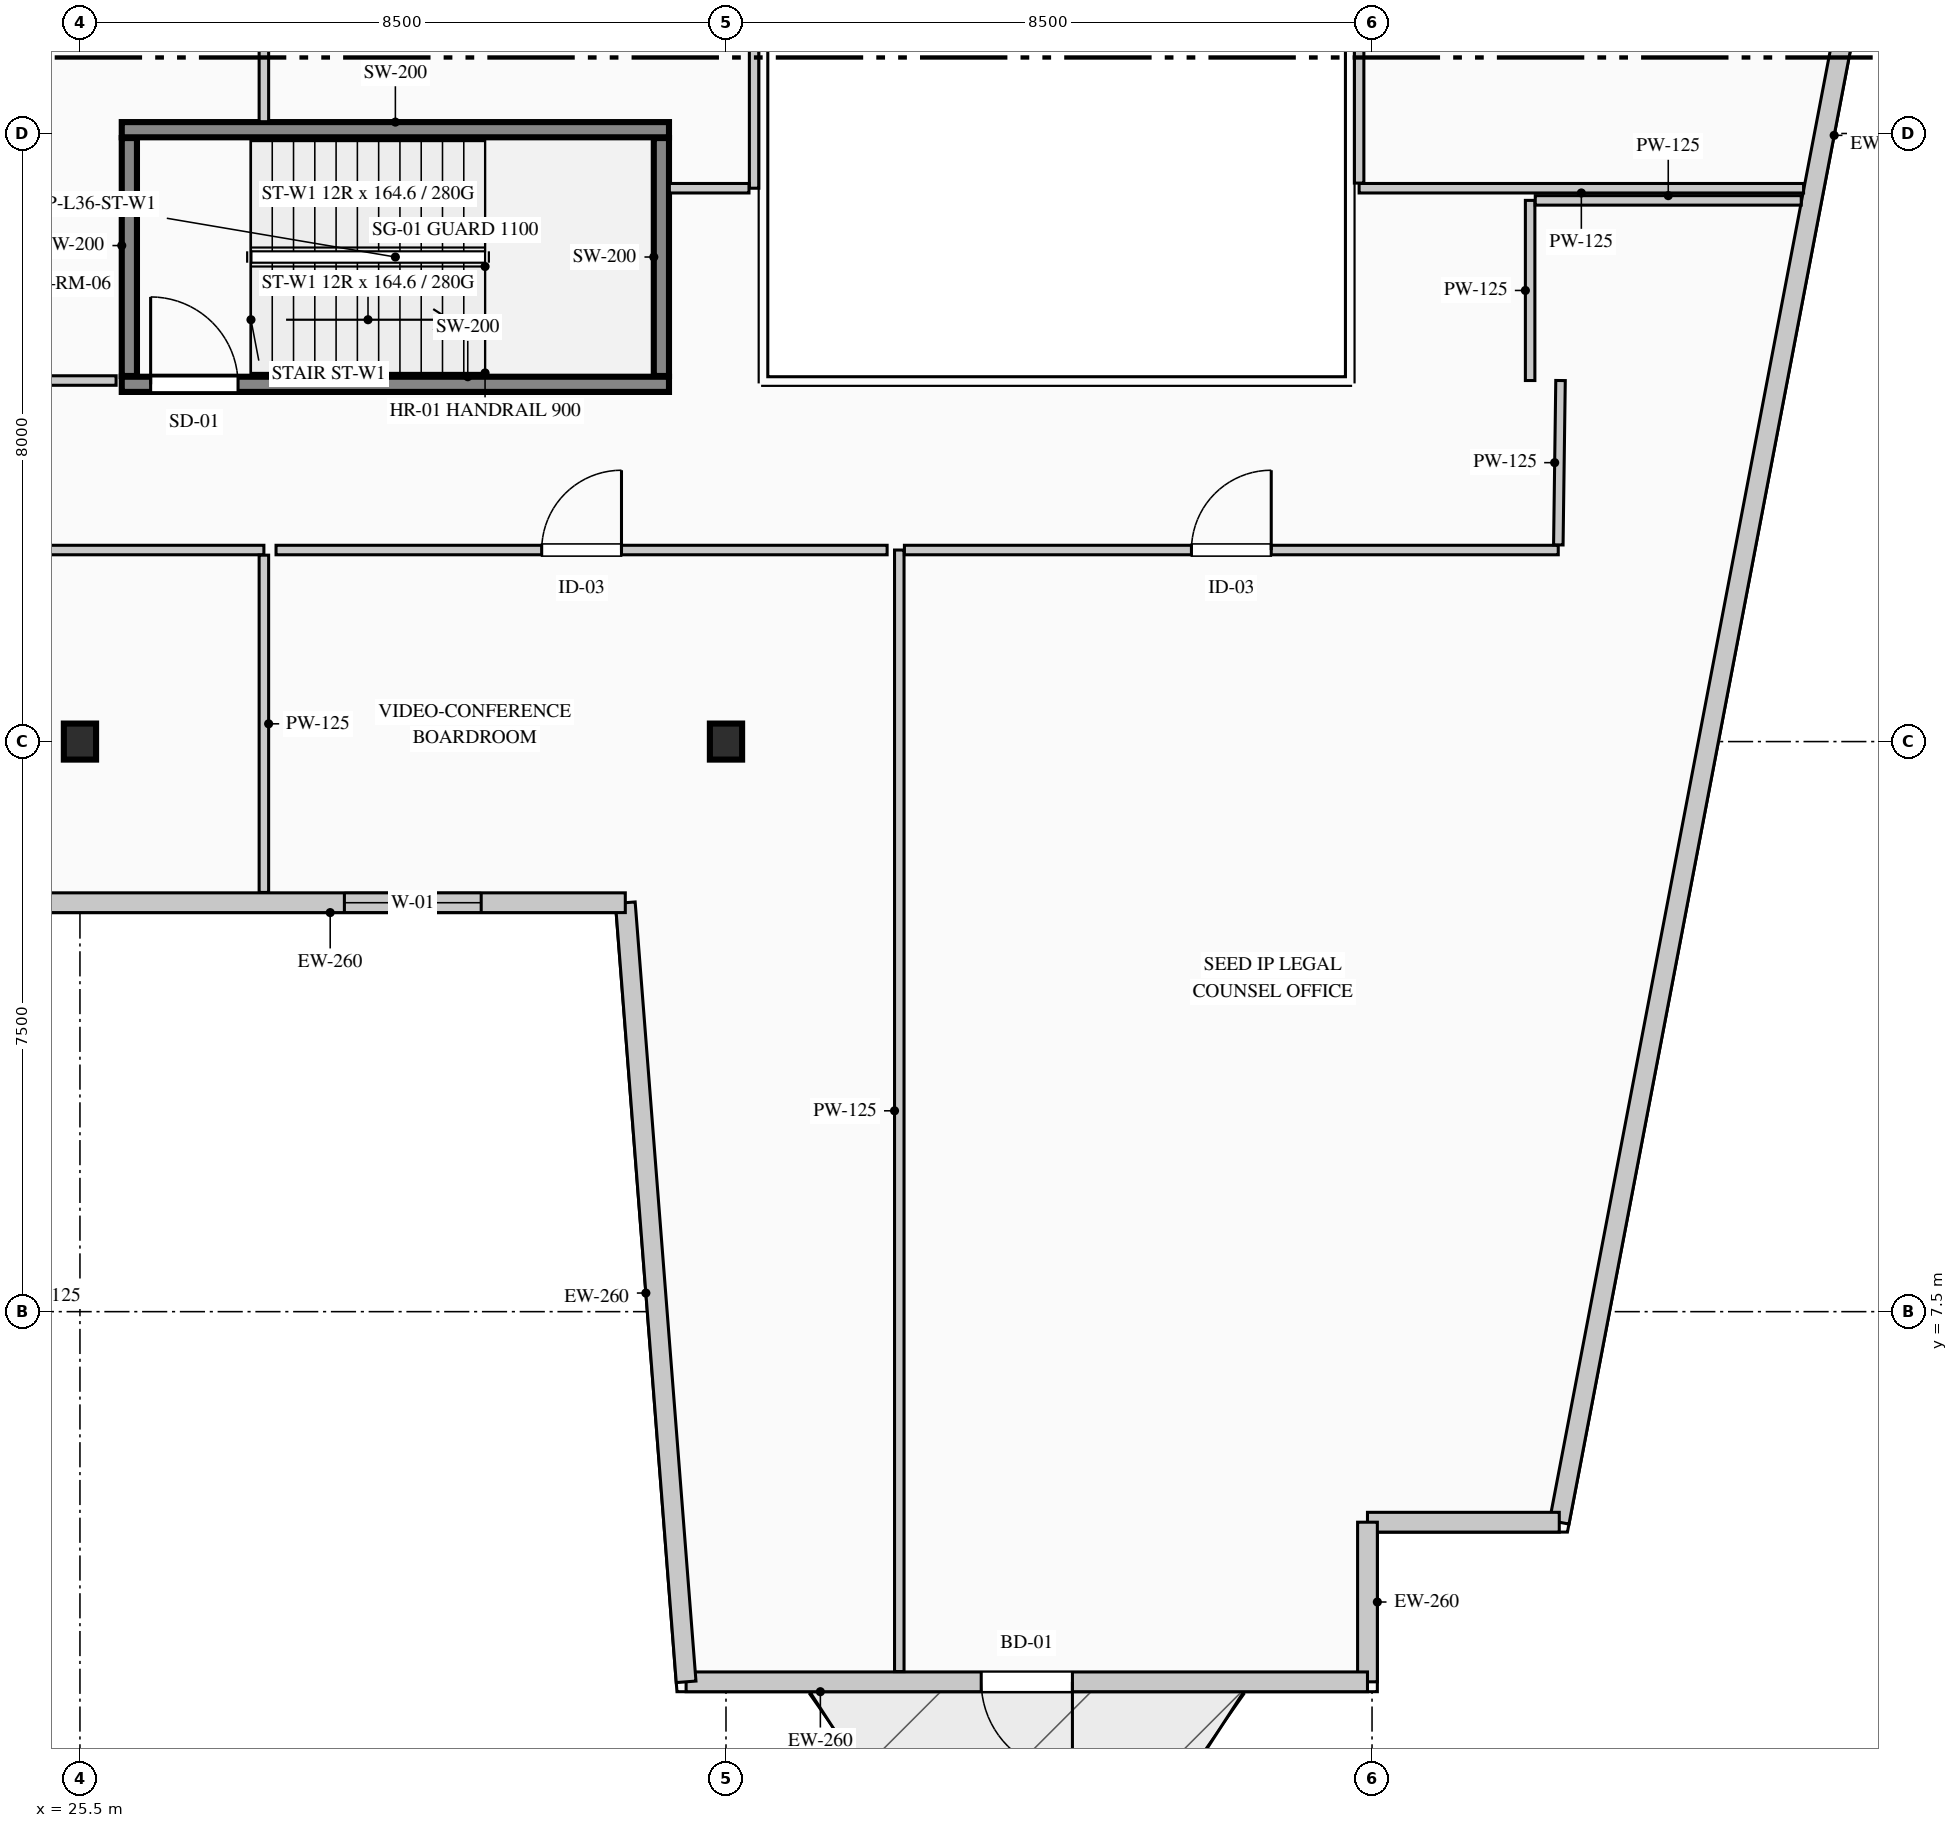
"""IFC4 building model, lengths in metres.
Left out: names, types, materials, properties, quantities, classifications, styles, units other than length and angle.
Written with IfcOpenShell. Run it as: python <this file> out.ifc"""

import sys

from ifc_helpers import new_model, si_unit, direction, frame, frame_2d, origin, origin_2d, place, context, subcontext, project, spatial, rectangle, i_section, extrude, element, fill, save


model = new_model("IFC4")
c1 = context("Model", 3, precision=1e-05, world=origin(), true_north=direction((0.0, 1.0)))
c2 = subcontext(c1, "Body", "Model", "MODEL_VIEW")
j1 = project(units=[si_unit("LENGTHUNIT", "METRE"), si_unit("PLANEANGLEUNIT", "RADIAN")], contexts=[c1])
p1 = place(None, origin())
s1 = spatial("IfcSite", under=j1, at=p1, CompositionType="ELEMENT")
p2 = place(p1, origin())
s2 = spatial("IfcBuilding", under=s1, at=p2, CompositionType="ELEMENT")
p3 = place(p2, frame((0.0, 0.0, 154.85)))
s3 = spatial("IfcBuildingStorey", under=s2, at=p3, CompositionType="ELEMENT", Elevation=154.85)
p4 = place(p3, frame((26.05, 19.7, 0.0), z_axis=(0.0, 0.0, 1.0), x_axis=(1.0, 0.0, 0.0)))
e1 = element("IfcWall", 1, at=p4, inside=s3, PredefinedType="SHEAR", context=c2, shape_type="SweptSolid", body=[
    extrude(rectangle(XDim=7.2, YDim=0.2, at=frame_2d((3.6, 0.0))), origin(), (0.0, 0.0, 1.0), 3.95),
])
p5 = place(p4, frame((0.38, 0.0, 0.0)))
e2 = element("IfcOpeningElement", 2, at=p5, cuts=e1, PredefinedType="OPENING", context=c2, shape_type="SweptSolid", body=[
    extrude(rectangle(XDim=1.15, YDim=2.2, at=frame_2d((0.575, 1.1))), frame((0.0, 0.11, 0.0), z_axis=(0.0, -1.0, 0.0), x_axis=(1.0, 0.0, 0.0)), (0.0, 0.0, 1.0), 0.22),
])
p6 = place(p3, frame((26.05, 23.05, 0.0), z_axis=(0.0, 0.0, 1.0), x_axis=(1.0, 0.0, 0.0)))
e3 = element("IfcWall", 3, at=p6, inside=s3, PredefinedType="SHEAR", context=c2, shape_type="SweptSolid", body=[
    extrude(rectangle(XDim=7.2, YDim=0.2, at=frame_2d((3.6, 0.0))), origin(), (0.0, 0.0, 1.0), 3.95),
])
for number, where, z_axis, x_axis in (
    (4, (26.15, 19.81, 0.0), (0.0, 0.0, 1.0), (0.0, 1.0, 0.0)),
    (5, (33.15, 19.81, 0.0), (0.0, 0.0, 1.0), (0.0, 1.0, 0.0)),
):
    element("IfcWall", number, at=place(p3, frame(where, z_axis=z_axis, x_axis=x_axis)), inside=s3, PredefinedType="SHEAR", context=c2, shape_type="SweptSolid", body=[
        extrude(rectangle(XDim=3.13, YDim=0.2, at=frame_2d((1.565, 0.0))), origin(), (0.0, 0.0, 1.0), 3.95),
    ])
for number, where, z_axis, x_axis in (
    (6, (25.5, 15.0, 0.0), (0.0, 0.0, 1.0), (1.0, 0.0, 0.0)),
    (7, (34.0, 15.0, 0.0), (0.0, 0.0, 1.0), (1.0, 0.0, 0.0)),
):
    element("IfcColumn", number, at=place(p3, frame(where, z_axis=z_axis, x_axis=x_axis)), inside=s3, PredefinedType="COLUMN", context=c2, shape_type="SweptSolid", body=[
        extrude(i_section(OverallWidth=0.424, OverallDepth=0.474, WebThickness=0.048, FlangeThickness=0.077, FilletRadius=0.015, at=origin_2d()), origin(), (0.0, 0.0, 1.0), 3.95),
    ])
p7 = place(p3, frame((51.942, 41.27, 0.0), z_axis=(0.0, 0.0, 1.0), x_axis=(-0.187592192405, -0.982247000173, 0.0)))
e8 = element("IfcWall", 8, at=p7, inside=s3, PredefinedType="STANDARD", context=c2, shape_type="SweptSolid", body=[
    extrude(rectangle(XDim=37.2, YDim=0.26, at=frame_2d((18.6, 0.0))), origin(), (0.0, 0.0, 1.0), 3.69),
])
p8 = place(p7, frame((12.342, 0.0, 0.9)))
e9 = element("IfcOpeningElement", 9, at=p8, cuts=e8, PredefinedType="OPENING", context=c2, shape_type="SweptSolid", body=[
    extrude(rectangle(XDim=2.1, YDim=2.0, at=frame_2d((1.05, 1.0))), frame((0.0, 0.14, 0.0), z_axis=(0.0, -1.0, 0.0), x_axis=(1.0, 0.0, 0.0)), (0.0, 0.0, 1.0), 0.28),
])
p9 = place(p3, frame((44.963, 4.73, 0.0), z_axis=(0.0, 0.0, 1.0), x_axis=(-1.0, 0.0, 0.0)))
e10 = element("IfcWall", 10, at=p9, inside=s3, PredefinedType="STANDARD", context=c2, shape_type="SweptSolid", body=[
    extrude(rectangle(XDim=2.523, YDim=0.26, at=frame_2d((1.262, 0.0))), origin(), (0.0, 0.0, 1.0), 3.69),
])
p10 = place(p3, frame((42.44, 4.73, 0.0), z_axis=(0.0, 0.0, 1.0), x_axis=(0.0, -1.0, 0.0)))
e11 = element("IfcWall", 11, at=p10, inside=s3, PredefinedType="STANDARD", context=c2, shape_type="SweptSolid", body=[
    extrude(rectangle(XDim=2.1, YDim=0.26, at=frame_2d((1.05, 0.0))), origin(), (0.0, 0.0, 1.0), 3.69),
])
p11 = place(p3, frame((42.44, 2.63, 0.0), z_axis=(0.0, 0.0, 1.0), x_axis=(-1.0, 0.0, 0.0)))
e12 = element("IfcWall", 12, at=p11, inside=s3, PredefinedType="STANDARD", context=c2, shape_type="SweptSolid", body=[
    extrude(rectangle(XDim=8.965, YDim=0.26, at=frame_2d((4.482, 0.0))), origin(), (0.0, 0.0, 1.0), 3.69),
])
p12 = place(p11, frame((3.882, 0.0, 0.0)))
e13 = element("IfcOpeningElement", 13, at=p12, cuts=e12, PredefinedType="OPENING", context=c2, shape_type="SweptSolid", body=[
    extrude(rectangle(XDim=1.2, YDim=2.2, at=frame_2d((0.6, 1.1))), frame((0.0, 0.14, 0.0), z_axis=(0.0, -1.0, 0.0), x_axis=(1.0, 0.0, 0.0)), (0.0, 0.0, 1.0), 0.28),
])
p13 = place(p3, frame((33.475, 2.63, 0.0), z_axis=(0.0, 0.0, 1.0), x_axis=(-0.077793257511, 0.996969512616, 0.0)))
e14 = element("IfcWall", 14, at=p13, inside=s3, PredefinedType="STANDARD", context=c2, shape_type="SweptSolid", body=[
    extrude(rectangle(XDim=10.281, YDim=0.26, at=frame_2d((5.141, 0.0))), origin(), (0.0, 0.0, 1.0), 3.69),
])
p14 = place(p3, frame((32.675, 12.88, 0.0), z_axis=(0.0, 0.0, 1.0), x_axis=(-1.0, 0.0, 0.0)))
e15 = element("IfcWall", 15, at=p14, inside=s3, PredefinedType="STANDARD", context=c2, shape_type="SweptSolid", body=[
    extrude(rectangle(XDim=7.765, YDim=0.26, at=frame_2d((3.883, 0.0))), origin(), (0.0, 0.0, 1.0), 3.69),
])
p15 = place(p14, frame((1.896, 0.0, 0.9)))
e16 = element("IfcOpeningElement", 16, at=p15, cuts=e15, PredefinedType="OPENING", context=c2, shape_type="SweptSolid", body=[
    extrude(rectangle(XDim=1.8, YDim=2.1, at=frame_2d((0.9, 1.05))), frame((0.0, 0.14, 0.0), z_axis=(0.0, -1.0, 0.0), x_axis=(1.0, 0.0, 0.0)), (0.0, 0.0, 1.0), 0.28),
])
p16 = place(p3, frame((19.58, 17.52, 0.0), z_axis=(0.0, 0.0, 1.0), x_axis=(1.0, 0.0, 0.0)))
e17 = element("IfcWall", 17, at=p16, inside=s3, PredefinedType="PARTITIONING", context=c2, shape_type="SweptSolid", body=[
    extrude(rectangle(XDim=8.34, YDim=0.125, at=frame_2d((4.17, 0.0))), origin(), (0.0, 0.0, 1.0), 3.475),
])
p17 = place(p16, frame((3.645, 0.0, 0.0)))
e18 = element("IfcOpeningElement", 18, at=p17, cuts=e17, PredefinedType="OPENING", context=c2, shape_type="SweptSolid", body=[
    extrude(rectangle(XDim=1.05, YDim=2.15, at=frame_2d((0.525, 1.075))), frame((0.0, 0.073, 0.0), z_axis=(0.0, -1.0, 0.0), x_axis=(1.0, 0.0, 0.0)), (0.0, 0.0, 1.0), 0.145),
])
p18 = place(p3, frame((27.92, 17.452, 0.0), z_axis=(0.0, 0.0, 1.0), x_axis=(0.0, -1.0, 0.0)))
e19 = element("IfcWall", 19, at=p18, inside=s3, PredefinedType="PARTITIONING", context=c2, shape_type="SweptSolid", body=[
    extrude(rectangle(XDim=4.438, YDim=0.125, at=frame_2d((2.219, 0.0))), origin(), (0.0, 0.0, 1.0), 3.69),
])
p19 = place(p3, frame((44.58, 19.75, 0.0), z_axis=(0.0, 0.0, 1.0), x_axis=(0.0, 1.0, 0.0)))
e20 = element("IfcWall", 20, at=p19, inside=s3, PredefinedType="PARTITIONING", context=c2, shape_type="SweptSolid", body=[
    extrude(rectangle(XDim=2.37, YDim=0.125, at=frame_2d((1.185, 0.0))), origin(), (0.0, 0.0, 1.0), 3.69),
])
p20 = place(p3, frame((44.647, 22.12, 0.0), z_axis=(0.0, 0.0, 1.0), x_axis=(1.0, 0.0, 0.0)))
e21 = element("IfcWall", 21, at=p20, inside=s3, PredefinedType="PARTITIONING", context=c2, shape_type="SweptSolid", body=[
    extrude(rectangle(XDim=3.5, YDim=0.125, at=frame_2d((1.75, 0.0))), origin(), (0.0, 0.0, 1.0), 3.69),
])
p21 = place(p3, frame((36.28, 2.765, 0.0), z_axis=(0.0, 0.0, 1.0), x_axis=(0.0, 1.0, 0.0)))
e22 = element("IfcWall", 22, at=p21, inside=s3, PredefinedType="PARTITIONING", context=c2, shape_type="SweptSolid", body=[
    extrude(rectangle(XDim=14.755, YDim=0.125, at=frame_2d((7.377, 0.0))), origin(), (0.0, 0.0, 1.0), 3.69),
])
p22 = place(p3, frame((36.347, 17.52, 0.0), z_axis=(0.0, 0.0, 1.0), x_axis=(1.0, 0.0, 0.0)))
e23 = element("IfcWall", 23, at=p22, inside=s3, PredefinedType="PARTITIONING", context=c2, shape_type="SweptSolid", body=[
    extrude(rectangle(XDim=8.603, YDim=0.125, at=frame_2d((4.301, 0.0))), origin(), (0.0, 0.0, 1.0), 3.69),
])
p23 = place(p22, frame((3.776, 0.0, 0.0)))
e24 = element("IfcOpeningElement", 24, at=p23, cuts=e23, PredefinedType="OPENING", context=c2, shape_type="SweptSolid", body=[
    extrude(rectangle(XDim=1.05, YDim=2.15, at=frame_2d((0.525, 1.075))), frame((0.0, 0.073, 0.0), z_axis=(0.0, -1.0, 0.0), x_axis=(1.0, 0.0, 0.0)), (0.0, 0.0, 1.0), 0.145),
])
p24 = place(p3, frame((44.951, 17.587, 0.0), z_axis=(0.0, 0.0, 1.0), x_axis=(0.01343297167, 0.999909773566, 0.0)))
e25 = element("IfcWall", 25, at=p24, inside=s3, PredefinedType="PARTITIONING", context=c2, shape_type="SweptSolid", body=[
    extrude(rectangle(XDim=2.163, YDim=0.125, at=frame_2d((1.082, 0.0))), origin(), (0.0, 0.0, 1.0), 3.69),
])
p25 = place(p3, frame((28.08, 17.52, 0.0), z_axis=(0.0, 0.0, 1.0), x_axis=(1.0, 0.0, 0.0)))
e26 = element("IfcWall", 26, at=p25, inside=s3, PredefinedType="PARTITIONING", context=c2, shape_type="SweptSolid", body=[
    extrude(rectangle(XDim=8.04, YDim=0.125, at=frame_2d((4.02, 0.0))), origin(), (0.0, 0.0, 1.0), 3.475),
])
p26 = place(p25, frame((3.495, 0.0, 0.0)))
e27 = element("IfcOpeningElement", 27, at=p26, cuts=e26, PredefinedType="OPENING", context=c2, shape_type="SweptSolid", body=[
    extrude(rectangle(XDim=1.05, YDim=2.15, at=frame_2d((0.525, 1.075))), frame((0.0, 0.073, 0.0), z_axis=(0.0, -1.0, 0.0), x_axis=(1.0, 0.0, 0.0)), (0.0, 0.0, 1.0), 0.145),
])
p27 = place(p3, frame((25.976, 19.75, 0.0), z_axis=(0.0, 0.0, 1.0), x_axis=(-1.0, 0.0, 0.0)))
e28 = element("IfcWall", 28, at=p27, inside=s3, PredefinedType="PARTITIONING", context=c2, shape_type="SweptSolid", body=[
    extrude(rectangle(XDim=3.066, YDim=0.125, at=frame_2d((1.533, 0.0))), origin(), (0.0, 0.0, 1.0), 3.69),
])
p28 = place(p27, frame((1.008, 0.0, 0.0)))
e29 = element("IfcOpeningElement", 29, at=p28, cuts=e28, PredefinedType="OPENING", context=c2, shape_type="SweptSolid", body=[
    extrude(rectangle(XDim=1.05, YDim=2.15, at=frame_2d((0.525, 1.075))), frame((0.0, 0.073, 0.0), z_axis=(0.0, -1.0, 0.0), x_axis=(1.0, 0.0, 0.0)), (0.0, 0.0, 1.0), 0.145),
])
p29 = place(p3, frame((22.91, 22.12, 0.0), z_axis=(0.0, 0.0, 1.0), x_axis=(1.0, 0.0, 0.0)))
e30 = element("IfcWall", 30, at=p29, inside=s3, PredefinedType="PARTITIONING", context=c2, shape_type="SweptSolid", body=[
    extrude(rectangle(XDim=3.135, YDim=0.125, at=frame_2d((1.567, 0.0))), origin(), (0.0, 0.0, 1.0), 3.69),
])
p30 = place(p3, frame((27.92, 28.502, 0.0), z_axis=(0.0, 0.0, 1.0), x_axis=(0.0, -1.0, 0.0)))
e31 = element("IfcWall", 31, at=p30, inside=s3, PredefinedType="PARTITIONING", context=c2, shape_type="SweptSolid", body=[
    extrude(rectangle(XDim=5.347, YDim=0.125, at=frame_2d((2.674, 0.0))), origin(), (0.0, 0.0, 1.0), 3.69),
])
p31 = place(p3, frame((34.37, 28.502, 0.0), z_axis=(0.0, 0.0, 1.0), x_axis=(0.0, -1.0, 0.0)))
e32 = element("IfcWall", 32, at=p31, inside=s3, PredefinedType="PARTITIONING", context=c2, shape_type="SweptSolid", body=[
    extrude(rectangle(XDim=6.222, YDim=0.125, at=frame_2d((3.111, 0.0))), origin(), (0.0, 0.0, 1.0), 3.69),
])
p32 = place(p3, frame((34.302, 22.28, 0.0), z_axis=(0.0, 0.0, 1.0), x_axis=(-1.0, 0.0, 0.0)))
e33 = element("IfcWall", 33, at=p32, inside=s3, PredefinedType="PARTITIONING", context=c2, shape_type="SweptSolid", body=[
    extrude(rectangle(XDim=1.048, YDim=0.125, at=frame_2d((0.524, 0.0))), origin(), (0.0, 0.0, 1.0), 3.69),
])
p33 = place(p3, frame((48.178, 22.28, 0.0), z_axis=(0.0, 0.0, 1.0), x_axis=(-1.0, 0.0, 0.0)))
e34 = element("IfcWall", 34, at=p33, inside=s3, PredefinedType="PARTITIONING", context=c2, shape_type="SweptSolid", body=[
    extrude(rectangle(XDim=5.848, YDim=0.125, at=frame_2d((2.924, 0.0))), origin(), (0.0, 0.0, 1.0), 3.69),
])
p34 = place(p3, frame((42.33, 22.347, 0.0), z_axis=(0.0, 0.0, 1.0), x_axis=(0.0, 1.0, 0.0)))
e35 = element("IfcWall", 35, at=p34, inside=s3, PredefinedType="PARTITIONING", context=c2, shape_type="SweptSolid", body=[
    extrude(rectangle(XDim=6.282, YDim=0.125, at=frame_2d((3.141, 0.0))), origin(), (0.0, 0.0, 1.0), 3.69),
])
p35 = place(p12, origin())
e36 = element("IfcDoor", 36, at=p35, inside=s3, OperationType="SINGLE_SWING_LEFT", PredefinedType="DOOR", context=c2, shape_type="SweptSolid", body=[
    extrude(rectangle(XDim=1.2, YDim=2.2, at=frame_2d((0.6, 1.1))), frame((0.0, 0.025, 0.0), z_axis=(0.0, -1.0, 0.0), x_axis=(1.0, 0.0, 0.0)), (0.0, 0.0, 1.0), 0.05),
])
fill(e13, e36)
p36 = place(p15, origin())
e37 = element("IfcWindow", 37, at=p36, inside=s3, PartitioningType="SINGLE_PANEL", PredefinedType="WINDOW", context=c2, shape_type="SweptSolid", body=[
    extrude(rectangle(XDim=1.8, YDim=2.1, at=frame_2d((0.9, 1.05))), frame((0.0, 0.03, 0.0), z_axis=(0.0, -1.0, 0.0), x_axis=(1.0, 0.0, 0.0)), (0.0, 0.0, 1.0), 0.06),
])
fill(e16, e37)
p37 = place(p5, origin())
e38 = element("IfcDoor", 38, at=p37, inside=s3, OperationType="SINGLE_SWING_LEFT", PredefinedType="DOOR", context=c2, shape_type="SweptSolid", body=[
    extrude(rectangle(XDim=1.15, YDim=2.2, at=frame_2d((0.575, 1.1))), frame((0.0, 0.025, 0.0), z_axis=(0.0, -1.0, 0.0), x_axis=(1.0, 0.0, 0.0)), (0.0, 0.0, 1.0), 0.05),
])
fill(e2, e38)
p38 = place(p23, origin())
e39 = element("IfcDoor", 39, at=p38, inside=s3, OperationType="SINGLE_SWING_RIGHT", PredefinedType="DOOR", context=c2, shape_type="SweptSolid", body=[
    extrude(rectangle(XDim=1.05, YDim=2.15, at=frame_2d((0.525, 1.075))), frame((0.0, 0.025, 0.0), z_axis=(0.0, -1.0, 0.0), x_axis=(1.0, 0.0, 0.0)), (0.0, 0.0, 1.0), 0.05),
])
fill(e24, e39)
p39 = place(p26, origin())
e40 = element("IfcDoor", 40, at=p39, inside=s3, OperationType="SINGLE_SWING_RIGHT", PredefinedType="DOOR", context=c2, shape_type="SweptSolid", body=[
    extrude(rectangle(XDim=1.05, YDim=2.15, at=frame_2d((0.525, 1.075))), frame((0.0, 0.025, 0.0), z_axis=(0.0, -1.0, 0.0), x_axis=(1.0, 0.0, 0.0)), (0.0, 0.0, 1.0), 0.05),
])
fill(e27, e40)
save(model, sys.argv[1])
